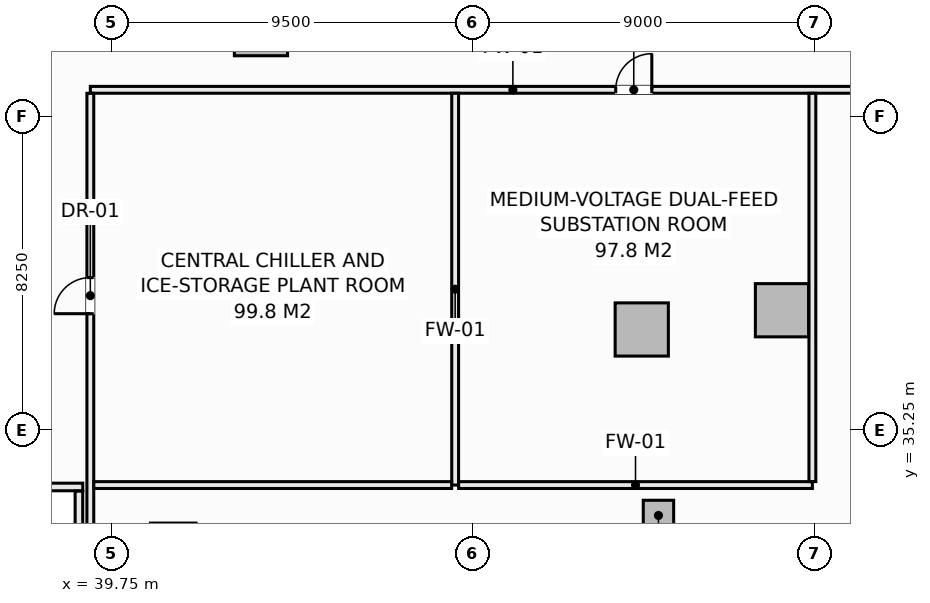
"""IFC4 building model, lengths in metres.
Left out: names, types, materials, properties, quantities, classifications, styles, units other than length and angle.
Written with IfcOpenShell. Run it as: python <this file> out.ifc"""

import sys

from ifc_helpers import new_model, si_unit, direction, frame, frame_2d, origin, origin_2d, place, context, subcontext, project, spatial, rectangle, extrude, element, fill, save


model = new_model("IFC4")
c1 = context("Model", 3, precision=1e-05, world=origin(), true_north=direction((0.0, 1.0)))
c2 = subcontext(c1, "Body", "Model", "MODEL_VIEW")
j1 = project(units=[si_unit("LENGTHUNIT", "METRE"), si_unit("PLANEANGLEUNIT", "RADIAN")], contexts=[c1])
p1 = place(None, origin())
s1 = spatial("IfcSite", under=j1, at=p1, CompositionType="ELEMENT")
p2 = place(p1, origin())
s2 = spatial("IfcBuilding", under=s1, at=p2, CompositionType="ELEMENT")
p3 = place(p2, frame((0.0, 0.0, -9.0)))
s3 = spatial("IfcBuildingStorey", under=s2, at=p3, CompositionType="ELEMENT", Elevation=-9.0)
for number, where, z_axis, x_axis in (
    (1, (53.71, 37.894, -0.32), (0.0, 0.0, 1.0), (1.0, 0.0, 0.0)),
    (2, (43.69, 45.796, -0.32), (0.0, 0.0, 1.0), (1.0, 0.0, 0.0)),
    (3, (57.4, 38.4, -0.32), (0.0, 0.0, 1.0), (1.0, 0.0, 0.0)),
):
    element("IfcColumn", number, at=place(p3, frame(where, z_axis=z_axis, x_axis=x_axis)), inside=s3, PredefinedType="COLUMN", context=c2, shape_type="SweptSolid", body=[
        extrude(rectangle(XDim=1.4, YDim=1.4, at=origin_2d()), origin(), (0.0, 0.0, 1.0), 4.5),
    ])
p4 = place(p3, frame((54.15, 33.0, -0.32), z_axis=(0.0, 0.0, 1.0), x_axis=(1.0, 0.0, 0.0)))
e4 = element("IfcColumn", 4, at=p4, inside=s3, PredefinedType="PILASTER", context=c2, shape_type="SweptSolid", body=[
    extrude(rectangle(XDim=0.8, YDim=0.8, at=origin_2d()), origin(), (0.0, 0.0, 1.0), 4.5),
])
p5 = place(p3, frame((36.75, 33.75, 0.0), z_axis=(0.0, 0.0, 1.0), x_axis=(1.0, 0.0, 0.0)))
e5 = element("IfcWall", 5, at=p5, inside=s3, PredefinedType="SOLIDWALL", context=c2, shape_type="SweptSolid", body=[
    extrude(rectangle(XDim=2.25, YDim=0.2, at=frame_2d((1.125, 0.0))), origin(), (0.0, 0.0, 1.0), 4.18),
])
p6 = place(p3, frame((38.9, 31.21, 0.0), z_axis=(0.0, 0.0, 1.0), x_axis=(0.0, 1.0, 0.0)))
e6 = element("IfcWall", 6, at=p6, inside=s3, PredefinedType="SOLIDWALL", context=c2, shape_type="SweptSolid", body=[
    extrude(rectangle(XDim=2.43, YDim=0.2, at=frame_2d((1.215, 0.0))), origin(), (0.0, 0.0, 1.0), 4.18),
])
p7 = place(p3, frame((39.2, 44.2, 0.0), z_axis=(0.0, 0.0, 1.0), x_axis=(1.0, 0.0, 0.0)))
e7 = element("IfcWall", 7, at=p7, inside=s3, PredefinedType="SOLIDWALL", context=c2, shape_type="SweptSolid", body=[
    extrude(rectangle(XDim=22.238, YDim=0.18, at=frame_2d((11.119, 0.0))), origin(), (0.0, 0.0, 1.0), 3.703),
])
p8 = place(p7, frame((13.825, 0.0, 0.0)))
e8 = element("IfcOpeningElement", 8, at=p8, cuts=e7, PredefinedType="OPENING", context=c2, shape_type="SweptSolid", body=[
    extrude(rectangle(XDim=0.95, YDim=2.1, at=frame_2d((0.475, 1.05))), frame((0.0, 0.1, 0.0), z_axis=(0.0, -1.0, 0.0), x_axis=(1.0, 0.0, 0.0)), (0.0, 0.0, 1.0), 0.2),
])
p9 = place(p3, frame((39.2, 28.997, 0.0), z_axis=(0.0, 0.0, 1.0), x_axis=(0.0, 1.0, 0.0)))
e9 = element("IfcWall", 9, at=p9, inside=s3, PredefinedType="SOLIDWALL", context=c2, shape_type="SweptSolid", body=[
    extrude(rectangle(XDim=15.111, YDim=0.18, at=frame_2d((7.555, 0.0))), origin(), (0.0, 0.0, 1.0), 3.414),
])
p10 = place(p9, frame((9.312, 0.0, 0.0)))
e10 = element("IfcOpeningElement", 10, at=p10, cuts=e9, PredefinedType="OPENING", context=c2, shape_type="SweptSolid", body=[
    extrude(rectangle(XDim=0.95, YDim=2.1, at=frame_2d((0.475, 1.05))), frame((0.0, 0.1, 0.0), z_axis=(0.0, -1.0, 0.0), x_axis=(1.0, 0.0, 0.0)), (0.0, 0.0, 1.0), 0.2),
])
p11 = place(p3, frame((48.8, 33.8, 0.0), z_axis=(0.0, 0.0, 1.0), x_axis=(0.0, 1.0, 0.0)))
e11 = element("IfcWall", 11, at=p11, inside=s3, PredefinedType="SOLIDWALL", context=c2, shape_type="SweptSolid", body=[
    extrude(rectangle(XDim=10.308, YDim=0.18, at=frame_2d((5.154, 0.0))), origin(), (0.0, 0.0, 1.0), 4.18),
])
p12 = place(p3, frame((39.292, 33.8, 0.0), z_axis=(0.0, 0.0, 1.0), x_axis=(1.0, 0.0, 0.0)))
e12 = element("IfcWall", 12, at=p12, inside=s3, PredefinedType="SOLIDWALL", context=c2, shape_type="SweptSolid", body=[
    extrude(rectangle(XDim=9.416, YDim=0.18, at=frame_2d((4.708, 0.0))), origin(), (0.0, 0.0, 1.0), 3.815),
])
p13 = place(p3, frame((48.892, 33.8, 0.0), z_axis=(0.0, 0.0, 1.0), x_axis=(1.0, 0.0, 0.0)))
e13 = element("IfcWall", 13, at=p13, inside=s3, PredefinedType="SOLIDWALL", context=c2, shape_type="SweptSolid", body=[
    extrude(rectangle(XDim=9.308, YDim=0.18, at=frame_2d((4.654, 0.0))), origin(), (0.0, 0.0, 1.0), 4.18),
])
p14 = place(p3, frame((58.2, 33.892, 0.0), z_axis=(0.0, 0.0, 1.0), x_axis=(0.0, 1.0, 0.0)))
e14 = element("IfcWall", 14, at=p14, inside=s3, PredefinedType="SOLIDWALL", context=c2, shape_type="SweptSolid", body=[
    extrude(rectangle(XDim=10.216, YDim=0.18, at=frame_2d((5.108, 0.0))), origin(), (0.0, 0.0, 1.0), 4.18),
])
p15 = place(p10, origin())
e15 = element("IfcDoor", 15, at=p15, inside=s3, OperationType="SINGLE_SWING_LEFT", PredefinedType="DOOR", context=c2, shape_type="SweptSolid", body=[
    extrude(rectangle(XDim=0.95, YDim=2.1, at=frame_2d((0.475, 1.05))), frame((0.0, 0.025, 0.0), z_axis=(0.0, -1.0, 0.0), x_axis=(1.0, 0.0, 0.0)), (0.0, 0.0, 1.0), 0.05),
])
fill(e10, e15)
p16 = place(p8, origin())
e16 = element("IfcDoor", 16, at=p16, inside=s3, OperationType="SINGLE_SWING_RIGHT", PredefinedType="DOOR", context=c2, shape_type="SweptSolid", body=[
    extrude(rectangle(XDim=0.95, YDim=2.1, at=frame_2d((0.475, 1.05))), frame((0.0, 0.025, 0.0), z_axis=(0.0, -1.0, 0.0), x_axis=(1.0, 0.0, 0.0)), (0.0, 0.0, 1.0), 0.05),
])
fill(e8, e16)
save(model, sys.argv[1])
